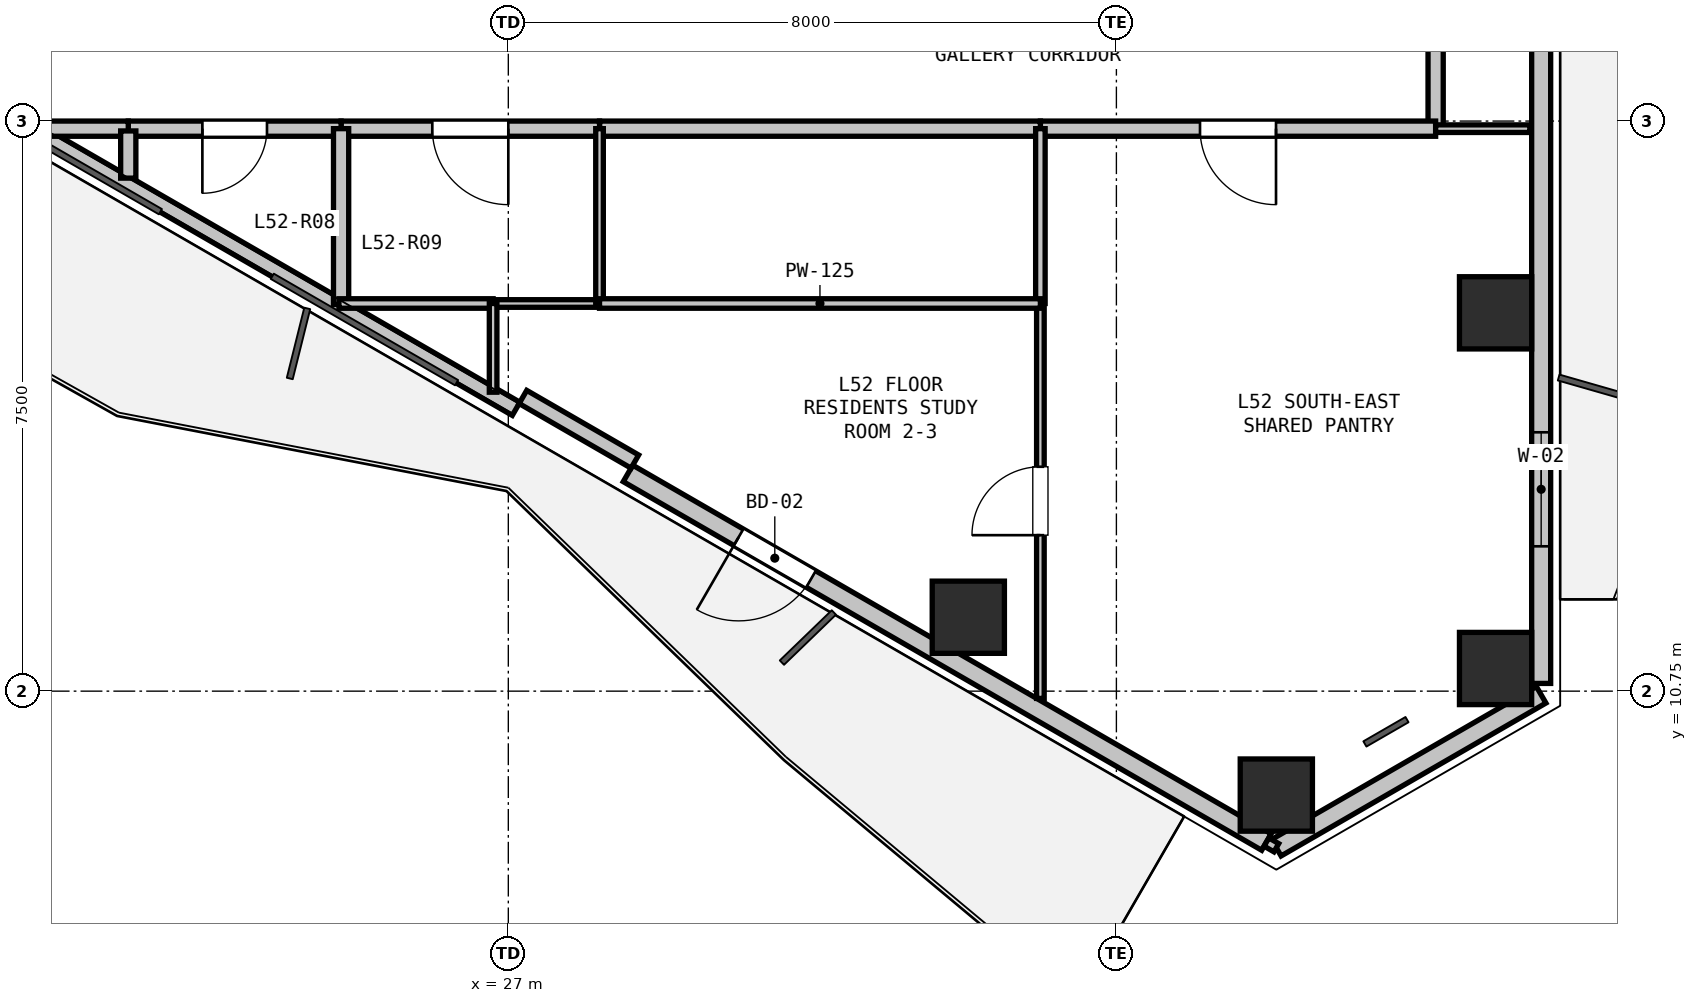
"""IFC4 building model, lengths in metres.
Left out: names, types, materials, properties, quantities, classifications, styles, units other than length and angle.
Written with IfcOpenShell. Run it as: python <this file> out.ifc"""

import sys

from ifc_helpers import new_model, si_unit, direction, frame, frame_2d, origin, origin_2d, place, context, subcontext, project, spatial, rectangle, hollow_rectangle, extrude, element, fill, save


model = new_model("IFC4")
c1 = context("Model", 3, precision=1e-05, world=origin(), true_north=direction((0.0, 1.0)))
c2 = subcontext(c1, "Body", "Model", "MODEL_VIEW")
j1 = project(units=[si_unit("LENGTHUNIT", "METRE"), si_unit("PLANEANGLEUNIT", "RADIAN")], contexts=[c1])
p1 = place(None, origin())
s1 = spatial("IfcSite", under=j1, at=p1, CompositionType="ELEMENT")
p2 = place(p1, origin())
s2 = spatial("IfcBuilding", under=s1, at=p2, CompositionType="ELEMENT")
p3 = place(p2, frame((0.0, 0.0, 188.7)))
s3 = spatial("IfcBuildingStorey", under=s2, at=p3, CompositionType="ELEMENT", Elevation=188.7)
for number, where, z_axis, x_axis in (
    (1, (39.988, 15.727, 0.0), (0.0, 0.0, 1.0), (1.0, 0.0, 0.0)),
    (2, (39.988, 11.048, 0.0), (0.0, 0.0, 1.0), (1.0, 0.0, 0.0)),
    (3, (37.104, 9.383, 0.0), (0.0, 0.0, 1.0), (1.0, 0.0, 0.0)),
    (4, (33.052, 11.722, 0.0), (0.0, 0.0, 1.0), (1.0, 0.0, 0.0)),
):
    element("IfcColumn", number, at=place(p3, frame(where, z_axis=z_axis, x_axis=x_axis)), inside=s3, PredefinedType="COLUMN", context=c2, shape_type="SweptSolid", body=[
        extrude(hollow_rectangle(XDim=0.95, YDim=0.95, WallThickness=0.028, at=origin_2d()), origin(), (0.0, 0.0, 1.0), 3.3),
    ])
p4 = place(p3, frame((40.588, 10.702, 0.0), z_axis=(0.0, 0.0, 1.0), x_axis=(-0.866023907196, -0.500002592159, 0.0)))
e5 = element("IfcWall", 5, at=p4, inside=s3, PredefinedType="SOLIDWALL", context=c2, shape_type="SweptSolid", body=[
    extrude(rectangle(XDim=4.023, YDim=0.25, at=frame_2d((2.012, 0.0))), origin(), (0.0, 0.0, 1.0), 2.69),
])
p5 = place(p3, frame((40.588, 20.551, 0.0), z_axis=(0.0, 0.0, 1.0), x_axis=(0.0, -1.0, 0.0)))
e6 = element("IfcWall", 6, at=p5, inside=s3, PredefinedType="SOLIDWALL", context=c2, shape_type="SweptSolid", body=[
    extrude(rectangle(XDim=9.699, YDim=0.25, at=frame_2d((4.85, 0.0))), origin(), (0.0, 0.0, 1.0), 2.69),
])
p6 = place(p5, frame((6.395, 0.0, 0.9)))
e7 = element("IfcOpeningElement", 7, at=p6, cuts=e6, PredefinedType="OPENING", context=c2, shape_type="SweptSolid", body=[
    extrude(rectangle(XDim=1.5, YDim=1.5, at=frame_2d((0.75, 0.75))), frame((0.0, 0.135, 0.0), z_axis=(0.0, -1.0, 0.0), x_axis=(1.0, 0.0, 0.0)), (0.0, 0.0, 1.0), 0.27),
])
p7 = place(p3, frame((36.974, 8.765, 0.0), z_axis=(0.0, 0.0, 1.0), x_axis=(-0.866016233231, 0.500015883528, 0.0)))
e8 = element("IfcWall", 8, at=p7, inside=s3, PredefinedType="SOLIDWALL", context=c2, shape_type="SweptSolid", body=[
    extrude(rectangle(XDim=9.699, YDim=0.25, at=frame_2d((4.85, 0.0))), origin(), (0.0, 0.0, 1.0), 2.69),
])
p8 = place(p7, frame((6.919, 0.0, 0.0)))
e9 = element("IfcOpeningElement", 9, at=p8, cuts=e8, PredefinedType="OPENING", context=c2, shape_type="SweptSolid", body=[
    extrude(rectangle(XDim=1.1, YDim=2.1, at=frame_2d((0.55, 1.05))), frame((0.0, 0.135, 0.0), z_axis=(0.0, -1.0, 0.0), x_axis=(1.0, 0.0, 0.0)), (0.0, 0.0, 1.0), 0.27),
])
p9 = place(p3, frame((27.102, 14.464, 0.0), z_axis=(0.0, 0.0, 1.0), x_axis=(-0.866020680503, 0.500008180874, 0.0)))
e10 = element("IfcWall", 10, at=p9, inside=s3, PredefinedType="PARAPET", context=c2, shape_type="SweptSolid", body=[
    extrude(rectangle(XDim=8.999, YDim=0.2, at=frame_2d((4.5, 0.0))), origin(), (0.0, 0.0, 1.0), 0.2),
])
p10 = place(p3, frame((28.665, 13.77, 0.0), z_axis=(0.0, 0.0, 1.0), x_axis=(-0.866025371046, 0.500000056704, 0.0)))
e11 = element("IfcWall", 11, at=p10, inside=s3, PredefinedType="PARAPET", context=c2, shape_type="SweptSolid", body=[
    extrude(rectangle(XDim=1.7, YDim=0.2, at=frame_2d((0.85, 0.0))), origin(), (0.0, 0.0, 1.0), 2.69),
])
p11 = place(p3, frame((39.2, 19.9, 0.0), z_axis=(0.0, 0.0, 1.0), x_axis=(0.0, -1.0, 0.0)))
e12 = element("IfcWall", 12, at=p11, inside=s3, PredefinedType="PARTITIONING", context=c2, shape_type="SweptSolid", body=[
    extrude(rectangle(XDim=1.75, YDim=0.2, at=frame_2d((0.875, 0.0))), origin(), (0.0, 0.0, 1.0), 3.07),
])
p12 = place(p3, frame((39.2, 18.15, 0.0), z_axis=(0.0, 0.0, 1.0), x_axis=(-1.0, 0.0, 0.0)))
e13 = element("IfcWall", 13, at=p12, inside=s3, PredefinedType="PARTITIONING", context=c2, shape_type="SweptSolid", body=[
    extrude(rectangle(XDim=5.2, YDim=0.2, at=frame_2d((2.6, 0.0))), origin(), (0.0, 0.0, 1.0), 2.518),
])
p13 = place(p12, frame((2.1, 0.0, 0.0)))
e14 = element("IfcOpeningElement", 14, at=p13, cuts=e13, PredefinedType="OPENING", context=c2, shape_type="SweptSolid", body=[
    extrude(rectangle(XDim=1.0, YDim=2.15, at=frame_2d((0.5, 1.075))), frame((0.0, 0.11, 0.0), z_axis=(0.0, -1.0, 0.0), x_axis=(1.0, 0.0, 0.0)), (0.0, 0.0, 1.0), 0.22),
])
p14 = place(p3, frame((34.0, 18.15, 0.0), z_axis=(0.0, 0.0, 1.0), x_axis=(-1.0, 0.0, 0.0)))
e15 = element("IfcWall", 15, at=p14, inside=s3, PredefinedType="PARTITIONING", context=c2, shape_type="SweptSolid", body=[
    extrude(rectangle(XDim=5.8, YDim=0.2, at=frame_2d((2.9, 0.0))), origin(), (0.0, 0.0, 1.0), 3.07),
])
p15 = place(p3, frame((28.2, 18.15, 0.0), z_axis=(0.0, 0.0, 1.0), x_axis=(-1.0, 0.0, 0.0)))
e16 = element("IfcWall", 16, at=p15, inside=s3, PredefinedType="PARTITIONING", context=c2, shape_type="SweptSolid", body=[
    extrude(rectangle(XDim=3.4, YDim=0.2, at=frame_2d((1.7, 0.0))), origin(), (0.0, 0.0, 1.0), 2.518),
])
p16 = place(p15, frame((1.2, 0.0, 0.0)))
e17 = element("IfcOpeningElement", 17, at=p16, cuts=e16, PredefinedType="OPENING", context=c2, shape_type="SweptSolid", body=[
    extrude(rectangle(XDim=1.0, YDim=2.15, at=frame_2d((0.5, 1.075))), frame((0.0, 0.11, 0.0), z_axis=(0.0, -1.0, 0.0), x_axis=(1.0, 0.0, 0.0)), (0.0, 0.0, 1.0), 0.22),
])
p17 = place(p3, frame((24.8, 18.15, 0.0), z_axis=(0.0, 0.0, 1.0), x_axis=(-1.0, 0.0, 0.0)))
e18 = element("IfcWall", 18, at=p17, inside=s3, PredefinedType="PARTITIONING", context=c2, shape_type="SweptSolid", body=[
    extrude(rectangle(XDim=2.8, YDim=0.2, at=frame_2d((1.4, 0.0))), origin(), (0.0, 0.0, 1.0), 2.365),
])
p18 = place(p17, frame((0.975, 0.0, 0.0)))
e19 = element("IfcOpeningElement", 19, at=p18, cuts=e18, PredefinedType="OPENING", context=c2, shape_type="SweptSolid", body=[
    extrude(rectangle(XDim=0.85, YDim=2.1, at=frame_2d((0.425, 1.05))), frame((0.0, 0.11, 0.0), z_axis=(0.0, -1.0, 0.0), x_axis=(1.0, 0.0, 0.0)), (0.0, 0.0, 1.0), 0.22),
])
p19 = place(p3, frame((22.0, 18.15, 0.0), z_axis=(0.0, 0.0, 1.0), x_axis=(-1.0, 0.0, 0.0)))
e20 = element("IfcWall", 20, at=p19, inside=s3, PredefinedType="PARTITIONING", context=c2, shape_type="SweptSolid", body=[
    extrude(rectangle(XDim=1.212, YDim=0.2, at=frame_2d((0.606, 0.0))), origin(), (0.0, 0.0, 1.0), 2.365),
])
p20 = place(p3, frame((37.104, 8.69, 0.0), z_axis=(0.0, 0.0, 1.0), x_axis=(-0.866131372301, 0.499816412211, 0.0)))
e21 = element("IfcWall", 21, at=p20, inside=s3, PredefinedType="PARTITIONING", context=c2, shape_type="SweptSolid", body=[
    extrude(rectangle(XDim=0.15, YDim=0.125, at=frame_2d((0.075, 0.0))), origin(), (0.0, 0.0, 1.0), 3.07),
])
p21 = place(p3, frame((34.0, 10.654, 0.0), z_axis=(0.0, 0.0, 1.0), x_axis=(0.0, 1.0, 0.0)))
e22 = element("IfcWall", 22, at=p21, inside=s3, PredefinedType="PARTITIONING", context=c2, shape_type="SweptSolid", body=[
    extrude(rectangle(XDim=5.196, YDim=0.1, at=frame_2d((2.598, 0.0))), origin(), (0.0, 0.0, 1.0), 2.735),
])
p22 = place(p21, frame((2.148, 0.0, 0.0)))
e23 = element("IfcOpeningElement", 23, at=p22, cuts=e22, PredefinedType="OPENING", context=c2, shape_type="SweptSolid", body=[
    extrude(rectangle(XDim=0.9, YDim=2.1, at=frame_2d((0.45, 1.05))), frame((0.0, 0.06, 0.0), z_axis=(0.0, -1.0, 0.0), x_axis=(1.0, 0.0, 0.0)), (0.0, 0.0, 1.0), 0.12),
])
p23 = place(p3, frame((34.0, 15.85, 0.0), z_axis=(0.0, 0.0, 1.0), x_axis=(0.0, 1.0, 0.0)))
e24 = element("IfcWall", 24, at=p23, inside=s3, PredefinedType="PARTITIONING", context=c2, shape_type="SweptSolid", body=[
    extrude(rectangle(XDim=2.3, YDim=0.125, at=frame_2d((1.15, 0.0))), origin(), (0.0, 0.0, 1.0), 3.07),
])
p24 = place(p3, frame((39.2, 18.15, 0.0), z_axis=(0.0, 0.0, 1.0), x_axis=(1.0, 0.0, 0.0)))
e25 = element("IfcWall", 25, at=p24, inside=s3, PredefinedType="PARTITIONING", context=c2, shape_type="SweptSolid", body=[
    extrude(rectangle(XDim=1.24, YDim=0.1, at=frame_2d((0.62, 0.0))), origin(), (0.0, 0.0, 1.0), 2.365),
])
p25 = place(p3, frame((24.8, 18.15, 0.0), z_axis=(0.0, 0.0, 1.0), x_axis=(0.0, -1.0, 0.0)))
e26 = element("IfcWall", 26, at=p25, inside=s3, PredefinedType="PARTITIONING", context=c2, shape_type="SweptSolid", body=[
    extrude(rectangle(XDim=2.312, YDim=0.2, at=frame_2d((1.156, 0.0))), origin(), (0.0, 0.0, 1.0), 2.365),
])
p26 = place(p3, frame((22.0, 17.499, 0.0), z_axis=(0.0, 0.0, 1.0), x_axis=(0.0, 1.0, 0.0)))
e27 = element("IfcWall", 27, at=p26, inside=s3, PredefinedType="PARTITIONING", context=c2, shape_type="SweptSolid", body=[
    extrude(rectangle(XDim=0.621, YDim=0.2, at=frame_2d((0.311, 0.0))), origin(), (0.0, 0.0, 1.0), 2.365),
])
p27 = place(p3, frame((28.2, 15.85, 0.0), z_axis=(0.0, 0.0, 1.0), x_axis=(-1.0, 0.0, 0.0)))
e28 = element("IfcWall", 28, at=p27, inside=s3, PredefinedType="PARTITIONING", context=c2, shape_type="SweptSolid", body=[
    extrude(rectangle(XDim=1.4, YDim=0.1, at=frame_2d((0.7, 0.0))), origin(), (0.0, 0.0, 1.0), 2.518),
])
p28 = place(p3, frame((26.8, 15.85, 0.0), z_axis=(0.0, 0.0, 1.0), x_axis=(-1.0, 0.0, 0.0)))
e29 = element("IfcWall", 29, at=p28, inside=s3, PredefinedType="PARTITIONING", context=c2, shape_type="SweptSolid", body=[
    extrude(rectangle(XDim=2.029, YDim=0.125, at=frame_2d((1.014, 0.0))), origin(), (0.0, 0.0, 1.0), 2.365),
])
p29 = place(p3, frame((28.2, 18.15, 0.0), z_axis=(0.0, 0.0, 1.0), x_axis=(0.0, -1.0, 0.0)))
e30 = element("IfcWall", 30, at=p29, inside=s3, PredefinedType="PARTITIONING", context=c2, shape_type="SweptSolid", body=[
    extrude(rectangle(XDim=2.3, YDim=0.1, at=frame_2d((1.15, 0.0))), origin(), (0.0, 0.0, 1.0), 3.07),
])
p30 = place(p3, frame((28.2, 15.85, 0.0), z_axis=(0.0, 0.0, 1.0), x_axis=(1.0, 0.0, 0.0)))
e31 = element("IfcWall", 31, at=p30, inside=s3, PredefinedType="PARTITIONING", context=c2, shape_type="SweptSolid", body=[
    extrude(rectangle(XDim=5.8, YDim=0.125, at=frame_2d((2.9, 0.0))), origin(), (0.0, 0.0, 1.0), 3.07),
])
p31 = place(p3, frame((26.8, 14.683, 0.0), z_axis=(0.0, 0.0, 1.0), x_axis=(0.0, 1.0, 0.0)))
e32 = element("IfcWall", 32, at=p31, inside=s3, PredefinedType="PARTITIONING", context=c2, shape_type="SweptSolid", body=[
    extrude(rectangle(XDim=1.167, YDim=0.1, at=frame_2d((0.583, 0.0))), origin(), (0.0, 0.0, 1.0), 2.365),
])
p32 = place(p6, origin())
e33 = element("IfcWindow", 33, at=p32, inside=s3, PartitioningType="SINGLE_PANEL", PredefinedType="WINDOW", context=c2, shape_type="SweptSolid", body=[
    extrude(rectangle(XDim=1.5, YDim=1.5, at=frame_2d((0.75, 0.75))), frame((0.0, 0.03, 0.0), z_axis=(0.0, -1.0, 0.0), x_axis=(1.0, 0.0, 0.0)), (0.0, 0.0, 1.0), 0.06),
])
fill(e7, e33)
p33 = place(p8, origin())
e34 = element("IfcDoor", 34, at=p33, inside=s3, OperationType="SINGLE_SWING_RIGHT", PredefinedType="DOOR", context=c2, shape_type="SweptSolid", body=[
    extrude(rectangle(XDim=1.1, YDim=2.1, at=frame_2d((0.55, 1.05))), frame((0.0, 0.025, 0.0), z_axis=(0.0, -1.0, 0.0), x_axis=(1.0, 0.0, 0.0)), (0.0, 0.0, 1.0), 0.05),
])
fill(e9, e34)
p34 = place(p13, origin())
e35 = element("IfcDoor", 35, at=p34, inside=s3, OperationType="SINGLE_SWING_LEFT", PredefinedType="DOOR", context=c2, shape_type="SweptSolid", body=[
    extrude(rectangle(XDim=1.0, YDim=2.15, at=frame_2d((0.5, 1.075))), frame((0.0, 0.025, 0.0), z_axis=(0.0, -1.0, 0.0), x_axis=(1.0, 0.0, 0.0)), (0.0, 0.0, 1.0), 0.05),
])
fill(e14, e35)
p35 = place(p18, origin())
e36 = element("IfcDoor", 36, at=p35, inside=s3, OperationType="SINGLE_SWING_RIGHT", PredefinedType="DOOR", context=c2, shape_type="SweptSolid", body=[
    extrude(rectangle(XDim=0.85, YDim=2.1, at=frame_2d((0.425, 1.05))), frame((0.0, 0.025, 0.0), z_axis=(0.0, -1.0, 0.0), x_axis=(1.0, 0.0, 0.0)), (0.0, 0.0, 1.0), 0.05),
])
fill(e19, e36)
p36 = place(p16, origin())
e37 = element("IfcDoor", 37, at=p36, inside=s3, OperationType="SINGLE_SWING_LEFT", PredefinedType="DOOR", context=c2, shape_type="SweptSolid", body=[
    extrude(rectangle(XDim=1.0, YDim=2.15, at=frame_2d((0.5, 1.075))), frame((0.0, 0.025, 0.0), z_axis=(0.0, -1.0, 0.0), x_axis=(1.0, 0.0, 0.0)), (0.0, 0.0, 1.0), 0.05),
])
fill(e17, e37)
p37 = place(p22, origin())
e38 = element("IfcDoor", 38, at=p37, inside=s3, OperationType="SINGLE_SWING_LEFT", PredefinedType="DOOR", context=c2, shape_type="SweptSolid", body=[
    extrude(rectangle(XDim=0.9, YDim=2.1, at=frame_2d((0.45, 1.05))), frame((0.0, 0.025, 0.0), z_axis=(0.0, -1.0, 0.0), x_axis=(1.0, 0.0, 0.0)), (0.0, 0.0, 1.0), 0.05),
])
fill(e23, e38)
save(model, sys.argv[1])
